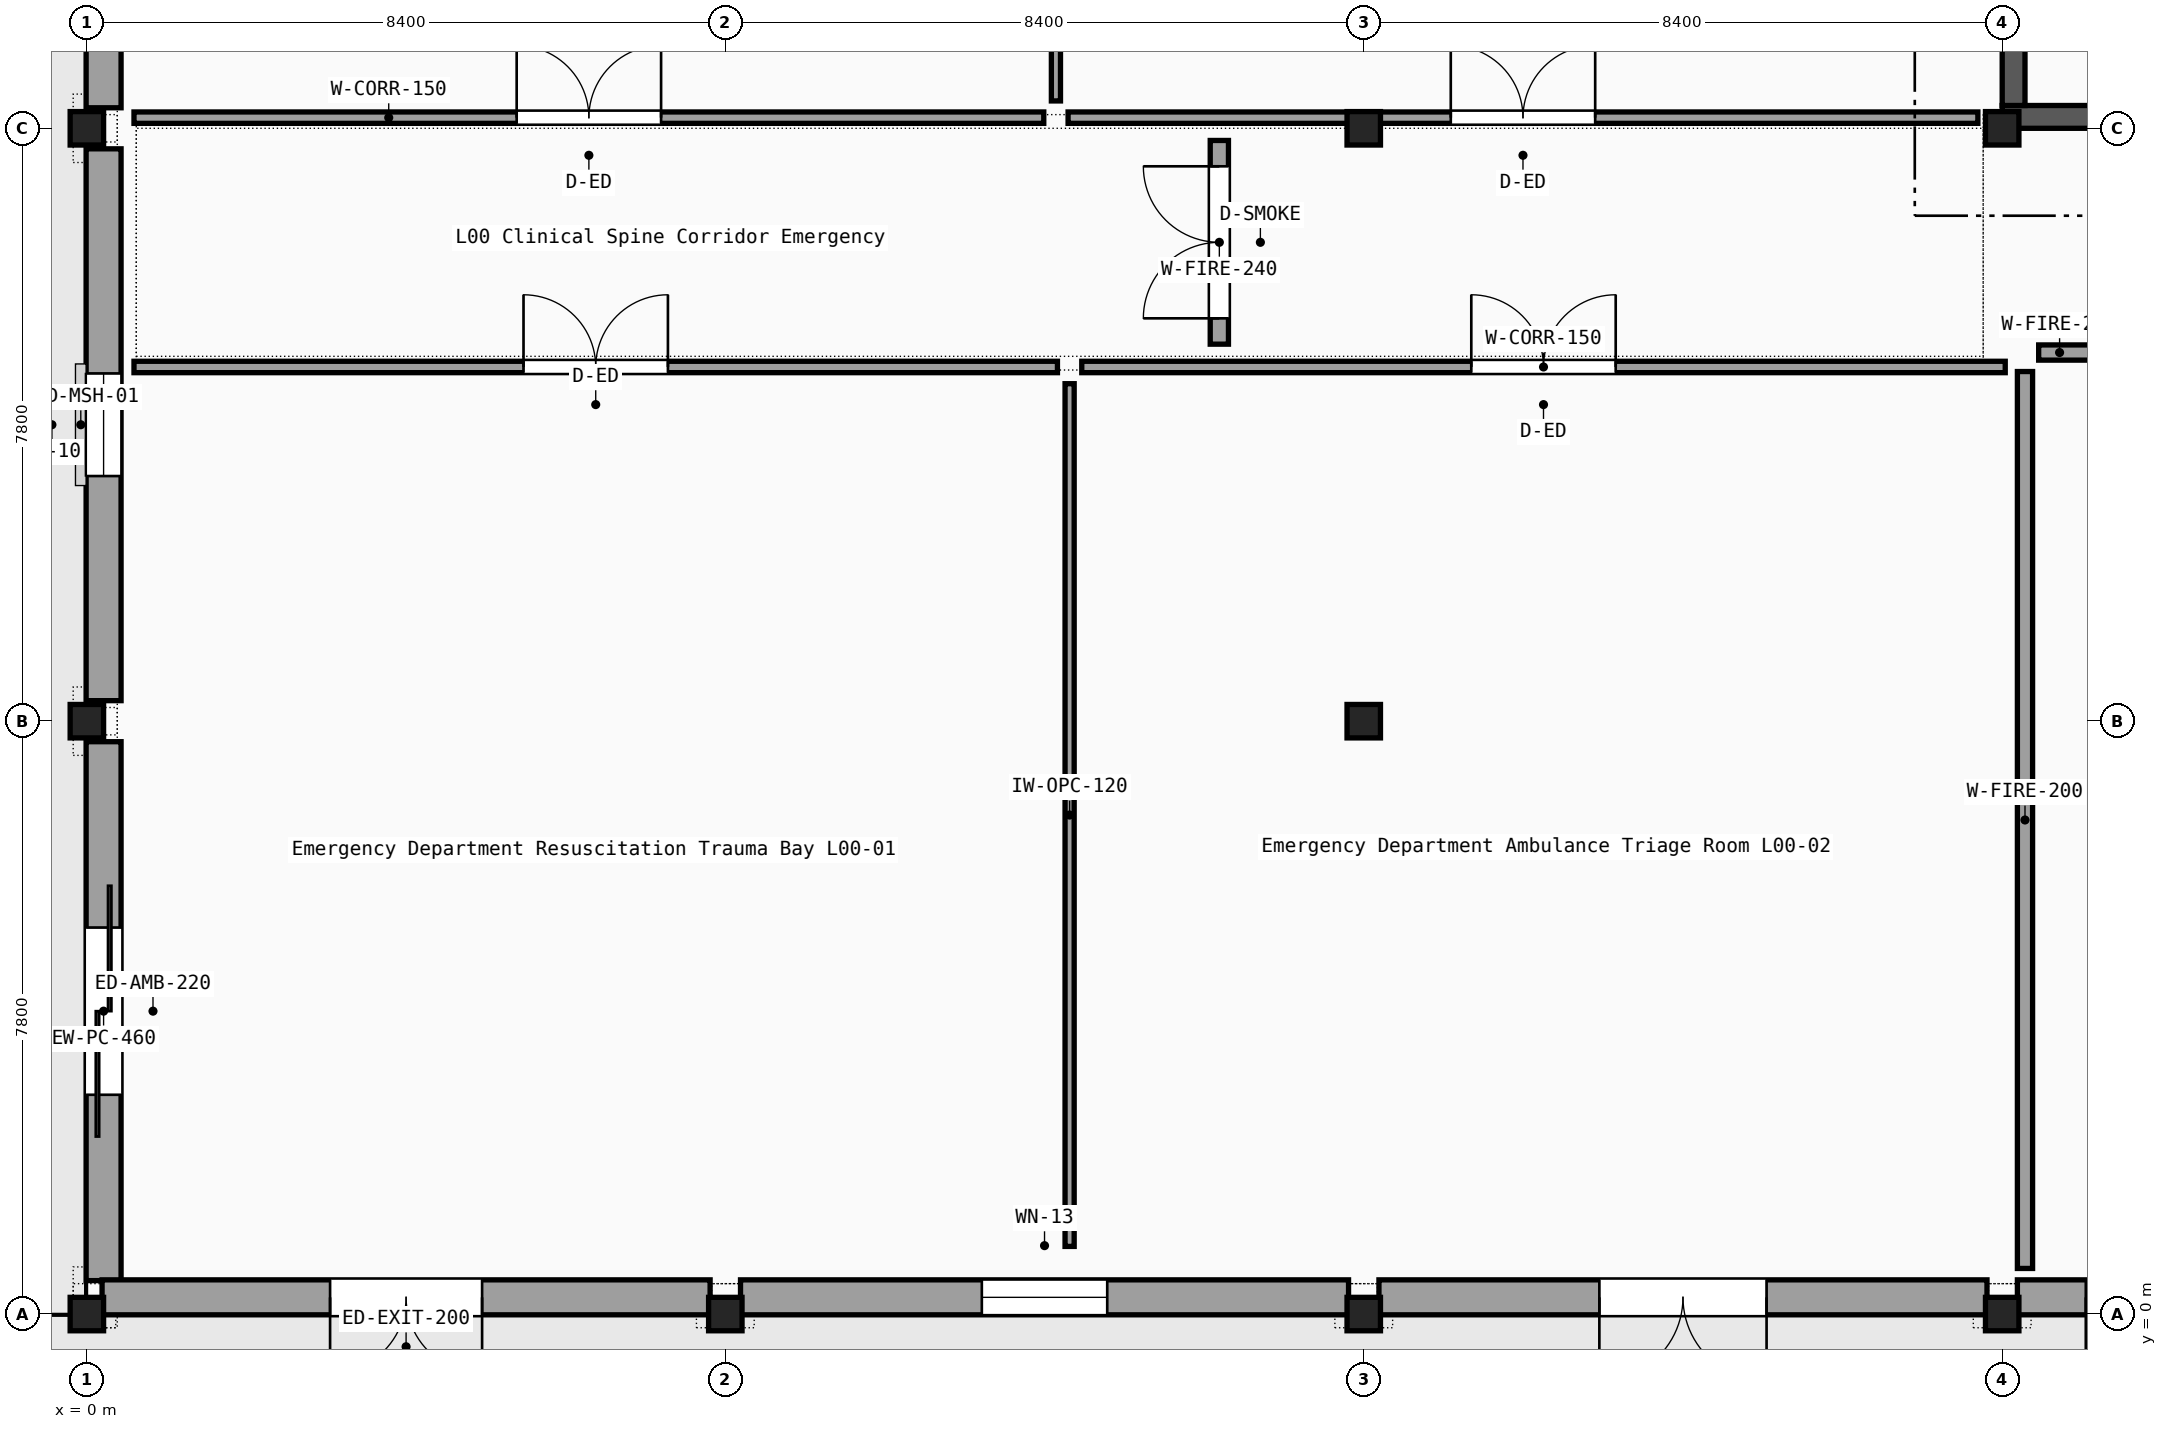
"""IFC4 building model, lengths in metres.
Left out: names, types, materials, properties, quantities, classifications, styles, units other than length and angle.
Written with IfcOpenShell. Run it as: python <this file> out.ifc"""

import sys

from ifc_helpers import new_model, si_unit, direction, frame, frame_2d, origin, origin_2d, place, context, subcontext, project, spatial, rectangle, i_section, extrude, element, fill, save


model = new_model("IFC4")
c1 = context("Model", 3, precision=1e-05, world=origin(), true_north=direction((0.0, 1.0)))
c2 = subcontext(c1, "Body", "Model", "MODEL_VIEW")
j1 = project(units=[si_unit("LENGTHUNIT", "METRE"), si_unit("PLANEANGLEUNIT", "RADIAN")], contexts=[c1])
p1 = place(None, origin())
s1 = spatial("IfcSite", under=j1, at=p1, CompositionType="ELEMENT")
p2 = place(p1, origin())
s2 = spatial("IfcBuilding", under=s1, at=p2, CompositionType="ELEMENT")
p3 = place(p2, origin())
s3 = spatial("IfcBuildingStorey", under=s2, at=p3, CompositionType="ELEMENT", Elevation=0.0)
for number, where, z_axis, x_axis in (
    (1, (0.0, 0.0, 0.0), (0.0, 0.0, 1.0), (1.0, 0.0, 0.0)),
    (2, (0.0, 7.8, 0.0), (0.0, 0.0, 1.0), (1.0, 0.0, 0.0)),
    (3, (0.0, 15.6, 0.0), (0.0, 0.0, 1.0), (1.0, 0.0, 0.0)),
    (4, (8.4, 0.0, 0.0), (0.0, 0.0, 1.0), (1.0, 0.0, 0.0)),
    (5, (16.8, 0.0, 0.0), (0.0, 0.0, 1.0), (1.0, 0.0, 0.0)),
    (6, (16.8, 7.8, 0.0), (0.0, 0.0, 1.0), (1.0, 0.0, 0.0)),
    (7, (16.8, 15.6, 0.0), (0.0, 0.0, 1.0), (1.0, 0.0, 0.0)),
    (8, (25.2, 0.0, 0.0), (0.0, 0.0, 1.0), (1.0, 0.0, 0.0)),
    (9, (25.2, 15.6, 0.0), (0.0, 0.0, 1.0), (1.0, 0.0, 0.0)),
):
    element("IfcColumn", number, at=place(p3, frame(where, z_axis=z_axis, x_axis=x_axis)), inside=s3, PredefinedType="COLUMN", context=c2, shape_type="SweptSolid", body=[
        extrude(i_section(OverallWidth=0.3, OverallDepth=0.44, WebThickness=0.011, FlangeThickness=0.021, FilletRadius=0.027, at=origin_2d()), origin(), (0.0, 0.0, 1.0), 5.1),
    ])
p4 = place(p3, frame((0.22, 0.44, 0.0), z_axis=(0.0, 0.0, 1.0), x_axis=(0.0, 1.0, 0.0)))
e10 = element("IfcWall", 10, at=p4, inside=s3, PredefinedType="SOLIDWALL", context=c2, shape_type="SweptSolid", body=[
    extrude(rectangle(XDim=7.09, YDim=0.46, at=frame_2d((3.545, 0.0))), origin(), (0.0, 0.0, 1.0), 4.33),
])
p5 = place(p4, frame((2.445, 0.0, 0.0)))
e11 = element("IfcOpeningElement", 11, at=p5, cuts=e10, PredefinedType="OPENING", context=c2, shape_type="SweptSolid", body=[
    extrude(rectangle(XDim=2.2, YDim=2.5, at=frame_2d((1.1, 1.25))), frame((0.0, 0.24, 0.0), z_axis=(0.0, -1.0, 0.0), x_axis=(1.0, 0.0, 0.0)), (0.0, 0.0, 1.0), 0.48),
])
p6 = place(p3, frame((0.22, 8.07, 0.0), z_axis=(0.0, 0.0, 1.0), x_axis=(0.0, 1.0, 0.0)))
e12 = element("IfcWall", 12, at=p6, inside=s3, PredefinedType="SOLIDWALL", context=c2, shape_type="SweptSolid", body=[
    extrude(rectangle(XDim=7.26, YDim=0.46, at=frame_2d((3.63, 0.0))), origin(), (0.0, 0.0, 1.0), 4.33),
])
p7 = place(p6, frame((2.955, 0.0, 1.0)))
e13 = element("IfcOpeningElement", 13, at=p7, cuts=e12, PredefinedType="OPENING", context=c2, shape_type="SweptSolid", body=[
    extrude(rectangle(XDim=1.35, YDim=1.45, at=frame_2d((0.675, 0.725))), frame((0.0, 0.24, 0.0), z_axis=(0.0, -1.0, 0.0), x_axis=(1.0, 0.0, 0.0)), (0.0, 0.0, 1.0), 0.48),
])
p8 = place(p3, frame((0.22, 15.87, 0.0), z_axis=(0.0, 0.0, 1.0), x_axis=(0.0, 1.0, 0.0)))
e14 = element("IfcWall", 14, at=p8, inside=s3, PredefinedType="SOLIDWALL", context=c2, shape_type="SweptSolid", body=[
    extrude(rectangle(XDim=7.26, YDim=0.46, at=frame_2d((3.63, 0.0))), origin(), (0.0, 0.0, 1.0), 4.33),
])
p9 = place(p8, frame((2.53, 0.0, 0.0)))
e15 = element("IfcOpeningElement", 15, at=p9, cuts=e14, PredefinedType="OPENING", context=c2, shape_type="SweptSolid", body=[
    extrude(rectangle(XDim=2.2, YDim=2.3, at=frame_2d((1.1, 1.15))), frame((0.0, 0.24, 0.0), z_axis=(0.0, -1.0, 0.0), x_axis=(1.0, 0.0, 0.0)), (0.0, 0.0, 1.0), 0.48),
])
p10 = place(p3, frame((0.2, 0.22, 0.0), z_axis=(0.0, 0.0, 1.0), x_axis=(1.0, 0.0, 0.0)))
e16 = element("IfcWall", 16, at=p10, inside=s3, PredefinedType="SOLIDWALL", context=c2, shape_type="SweptSolid", body=[
    extrude(rectangle(XDim=8.0, YDim=0.46, at=frame_2d((4.0, 0.0))), origin(), (0.0, 0.0, 1.0), 4.44),
])
p11 = place(p10, frame((3.0, 0.0, 0.0)))
e17 = element("IfcOpeningElement", 17, at=p11, cuts=e16, PredefinedType="OPENING", context=c2, shape_type="SweptSolid", body=[
    extrude(rectangle(XDim=2.0, YDim=2.25, at=frame_2d((1.0, 1.125))), frame((0.0, 0.24, 0.0), z_axis=(0.0, -1.0, 0.0), x_axis=(1.0, 0.0, 0.0)), (0.0, 0.0, 1.0), 0.48),
])
p12 = place(p3, frame((8.6, 0.22, 0.0), z_axis=(0.0, 0.0, 1.0), x_axis=(1.0, 0.0, 0.0)))
e18 = element("IfcWall", 18, at=p12, inside=s3, PredefinedType="SOLIDWALL", context=c2, shape_type="SweptSolid", body=[
    extrude(rectangle(XDim=8.0, YDim=0.46, at=frame_2d((4.0, 0.0))), origin(), (0.0, 0.0, 1.0), 4.43),
])
p13 = place(p12, frame((3.175, 0.0, 0.75)))
e19 = element("IfcOpeningElement", 19, at=p13, cuts=e18, PredefinedType="OPENING", context=c2, shape_type="SweptSolid", body=[
    extrude(rectangle(XDim=1.65, YDim=1.75, at=frame_2d((0.825, 0.875))), frame((0.0, 0.24, 0.0), z_axis=(0.0, -1.0, 0.0), x_axis=(1.0, 0.0, 0.0)), (0.0, 0.0, 1.0), 0.48),
])
p14 = place(p3, frame((17.0, 0.22, 0.0), z_axis=(0.0, 0.0, 1.0), x_axis=(1.0, 0.0, 0.0)))
e20 = element("IfcWall", 20, at=p14, inside=s3, PredefinedType="SOLIDWALL", context=c2, shape_type="SweptSolid", body=[
    extrude(rectangle(XDim=8.0, YDim=0.46, at=frame_2d((4.0, 0.0))), origin(), (0.0, 0.0, 1.0), 4.43),
])
p15 = place(p14, frame((2.9, 0.0, 0.0)))
e21 = element("IfcOpeningElement", 21, at=p15, cuts=e20, PredefinedType="OPENING", context=c2, shape_type="SweptSolid", body=[
    extrude(rectangle(XDim=2.2, YDim=2.3, at=frame_2d((1.1, 1.15))), frame((0.0, 0.24, 0.0), z_axis=(0.0, -1.0, 0.0), x_axis=(1.0, 0.0, 0.0)), (0.0, 0.0, 1.0), 0.48),
])
p16 = place(p3, frame((25.4, 0.22, 0.0), z_axis=(0.0, 0.0, 1.0), x_axis=(1.0, 0.0, 0.0)))
e22 = element("IfcWall", 22, at=p16, inside=s3, PredefinedType="SOLIDWALL", context=c2, shape_type="SweptSolid", body=[
    extrude(rectangle(XDim=8.0, YDim=0.46, at=frame_2d((4.0, 0.0))), origin(), (0.0, 0.0, 1.0), 4.43),
])
p17 = place(p16, frame((0.9, 0.0, 0.0)))
e23 = element("IfcOpeningElement", 23, at=p17, cuts=e22, PredefinedType="OPENING", context=c2, shape_type="SweptSolid", body=[
    extrude(rectangle(XDim=2.2, YDim=2.3, at=frame_2d((1.1, 1.15))), frame((0.0, 0.24, 0.0), z_axis=(0.0, -1.0, 0.0), x_axis=(1.0, 0.0, 0.0)), (0.0, 0.0, 1.0), 0.48),
])
p18 = place(p3, frame((25.2, 15.75, 0.0), z_axis=(0.0, 0.0, 1.0), x_axis=(1.0, 0.0, 0.0)))
e24 = element("IfcWall", 24, at=p18, inside=s3, PredefinedType="SHEAR", context=c2, shape_type="SweptSolid", body=[
    extrude(rectangle(XDim=8.4, YDim=0.3, at=frame_2d((4.2, 0.0))), origin(), (0.0, 0.0, 1.0), 4.85),
])
p19 = place(p18, frame((1.38, 0.0, 0.0)))
e25 = element("IfcOpeningElement", 25, at=p19, cuts=e24, PredefinedType="OPENING", context=c2, shape_type="SweptSolid", body=[
    extrude(rectangle(XDim=1.2, YDim=2.15, at=frame_2d((0.6, 1.075))), frame((0.0, 0.16, 0.0), z_axis=(0.0, -1.0, 0.0), x_axis=(1.0, 0.0, 0.0)), (0.0, 0.0, 1.0), 0.32),
])
p20 = place(p18, frame((4.43, 0.0, 0.0)))
e26 = element("IfcOpeningElement", 26, at=p20, cuts=e24, PredefinedType="OPENING", context=c2, shape_type="SweptSolid", body=[
    extrude(rectangle(XDim=1.1, YDim=2.15, at=frame_2d((0.55, 1.075))), frame((0.0, 0.16, 0.0), z_axis=(0.0, -1.0, 0.0), x_axis=(1.0, 0.0, 0.0)), (0.0, 0.0, 1.0), 0.32),
])
p21 = place(p3, frame((25.35, 15.9, 0.0), z_axis=(0.0, 0.0, 1.0), x_axis=(0.0, 1.0, 0.0)))
e27 = element("IfcWall", 27, at=p21, inside=s3, PredefinedType="SHEAR", context=c2, shape_type="SweptSolid", body=[
    extrude(rectangle(XDim=7.2, YDim=0.3, at=frame_2d((3.6, 0.0))), origin(), (0.0, 0.0, 1.0), 4.85),
])
p22 = place(p3, frame((25.5, 0.6, 0.0), z_axis=(0.0, 0.0, 1.0), x_axis=(0.0, 1.0, 0.0)))
e28 = element("IfcWall", 28, at=p22, inside=s3, PredefinedType="PARTITIONING", context=c2, shape_type="SweptSolid", body=[
    extrude(rectangle(XDim=11.8, YDim=0.2, at=frame_2d((5.9, 0.0))), origin(), (0.0, 0.0, 1.0), 4.33),
])
p23 = place(p3, frame((25.68, 12.65, 0.0), z_axis=(0.0, 0.0, 1.0), x_axis=(1.0, 0.0, 0.0)))
e29 = element("IfcWall", 29, at=p23, inside=s3, PredefinedType="PARTITIONING", context=c2, shape_type="SweptSolid", body=[
    extrude(rectangle(XDim=3.44, YDim=0.2, at=frame_2d((1.72, 0.0))), origin(), (0.0, 0.0, 1.0), 4.82),
])
p24 = place(p23, frame((0.92, 0.0, 0.0)))
e30 = element("IfcOpeningElement", 30, at=p24, cuts=e29, PredefinedType="OPENING", context=c2, shape_type="SweptSolid", body=[
    extrude(rectangle(XDim=1.6, YDim=2.2, at=frame_2d((0.8, 1.1))), frame((0.0, 0.11, 0.0), z_axis=(0.0, -1.0, 0.0), x_axis=(1.0, 0.0, 0.0)), (0.0, 0.0, 1.0), 0.22),
])
p25 = place(p3, frame((0.62, 12.46, 0.0), z_axis=(0.0, 0.0, 1.0), x_axis=(1.0, 0.0, 0.0)))
e31 = element("IfcWall", 31, at=p25, inside=s3, PredefinedType="PARTITIONING", context=c2, shape_type="SweptSolid", body=[
    extrude(rectangle(XDim=12.15, YDim=0.15, at=frame_2d((6.075, 0.0))), origin(), (0.0, 0.0, 1.0), 4.82),
])
p26 = place(p25, frame((5.125, 0.0, 0.0)))
e32 = element("IfcOpeningElement", 32, at=p26, cuts=e31, PredefinedType="OPENING", context=c2, shape_type="SweptSolid", body=[
    extrude(rectangle(XDim=1.9, YDim=2.35, at=frame_2d((0.95, 1.175))), frame((0.0, 0.085, 0.0), z_axis=(0.0, -1.0, 0.0), x_axis=(1.0, 0.0, 0.0)), (0.0, 0.0, 1.0), 0.17),
])
p27 = place(p3, frame((12.93, 0.89, 0.0), z_axis=(0.0, 0.0, 1.0), x_axis=(0.0, 1.0, 0.0)))
e33 = element("IfcWall", 33, at=p27, inside=s3, PredefinedType="PARTITIONING", context=c2, shape_type="SweptSolid", body=[
    extrude(rectangle(XDim=11.35, YDim=0.12, at=frame_2d((5.675, 0.0))), origin(), (0.0, 0.0, 1.0), 4.33),
])
p28 = place(p3, frame((13.09, 12.46, 0.0), z_axis=(0.0, 0.0, 1.0), x_axis=(1.0, 0.0, 0.0)))
e34 = element("IfcWall", 34, at=p28, inside=s3, PredefinedType="PARTITIONING", context=c2, shape_type="SweptSolid", body=[
    extrude(rectangle(XDim=12.15, YDim=0.15, at=frame_2d((6.075, 0.0))), origin(), (0.0, 0.0, 1.0), 4.43),
])
p29 = place(p28, frame((5.125, 0.0, 0.0)))
e35 = element("IfcOpeningElement", 35, at=p29, cuts=e34, PredefinedType="OPENING", context=c2, shape_type="SweptSolid", body=[
    extrude(rectangle(XDim=1.9, YDim=2.35, at=frame_2d((0.95, 1.175))), frame((0.0, 0.085, 0.0), z_axis=(0.0, -1.0, 0.0), x_axis=(1.0, 0.0, 0.0)), (0.0, 0.0, 1.0), 0.17),
])
p30 = place(p3, frame((0.62, 15.74, 0.0), z_axis=(0.0, 0.0, 1.0), x_axis=(1.0, 0.0, 0.0)))
e36 = element("IfcWall", 36, at=p30, inside=s3, PredefinedType="PARTITIONING", context=c2, shape_type="SweptSolid", body=[
    extrude(rectangle(XDim=11.97, YDim=0.15, at=frame_2d((5.985, 0.0))), origin(), (0.0, 0.0, 1.0), 4.33),
])
p31 = place(p30, frame((5.035, 0.0, 0.0)))
e37 = element("IfcOpeningElement", 37, at=p31, cuts=e36, PredefinedType="OPENING", context=c2, shape_type="SweptSolid", body=[
    extrude(rectangle(XDim=1.9, YDim=2.35, at=frame_2d((0.95, 1.175))), frame((0.0, 0.085, 0.0), z_axis=(0.0, -1.0, 0.0), x_axis=(1.0, 0.0, 0.0)), (0.0, 0.0, 1.0), 0.17),
])
p32 = place(p3, frame((12.75, 15.96, 0.0), z_axis=(0.0, 0.0, 1.0), x_axis=(0.0, 1.0, 0.0)))
e38 = element("IfcWall", 38, at=p32, inside=s3, PredefinedType="PARTITIONING", context=c2, shape_type="SweptSolid", body=[
    extrude(rectangle(XDim=22.35, YDim=0.12, at=frame_2d((11.175, 0.0))), origin(), (0.0, 0.0, 1.0), 4.33),
])
p33 = place(p3, frame((12.91, 15.74, 0.0), z_axis=(0.0, 0.0, 1.0), x_axis=(1.0, 0.0, 0.0)))
e39 = element("IfcWall", 39, at=p33, inside=s3, PredefinedType="PARTITIONING", context=c2, shape_type="SweptSolid", body=[
    extrude(rectangle(XDim=11.97, YDim=0.15, at=frame_2d((5.985, 0.0))), origin(), (0.0, 0.0, 1.0), 4.33),
])
p34 = place(p33, frame((5.035, 0.0, 0.0)))
e40 = element("IfcOpeningElement", 40, at=p34, cuts=e39, PredefinedType="OPENING", context=c2, shape_type="SweptSolid", body=[
    extrude(rectangle(XDim=1.9, YDim=2.35, at=frame_2d((0.95, 1.175))), frame((0.0, 0.085, 0.0), z_axis=(0.0, -1.0, 0.0), x_axis=(1.0, 0.0, 0.0)), (0.0, 0.0, 1.0), 0.17),
])
p35 = place(p3, frame((14.9, 12.76, 0.0), z_axis=(0.0, 0.0, 1.0), x_axis=(0.0, 1.0, 0.0)))
e41 = element("IfcWall", 41, at=p35, inside=s3, PredefinedType="PARTITIONING", context=c2, shape_type="SweptSolid", body=[
    extrude(rectangle(XDim=2.68, YDim=0.24, at=frame_2d((1.34, 0.0))), origin(), (0.0, 0.0, 1.0), 4.33),
])
p36 = place(p35, frame((0.34, 0.0, 0.0)))
e42 = element("IfcOpeningElement", 42, at=p36, cuts=e41, PredefinedType="OPENING", context=c2, shape_type="SweptSolid", body=[
    extrude(rectangle(XDim=2.0, YDim=2.3, at=frame_2d((1.0, 1.15))), frame((0.0, 0.13, 0.0), z_axis=(0.0, -1.0, 0.0), x_axis=(1.0, 0.0, 0.0)), (0.0, 0.0, 1.0), 0.26),
])
p37 = place(p5, origin())
e43 = element("IfcDoor", 43, at=p37, inside=s3, OperationType="DOUBLE_DOOR_SLIDING", PredefinedType="DOOR", context=c2, shape_type="SweptSolid", body=[
    extrude(rectangle(XDim=2.2, YDim=2.5, at=frame_2d((1.1, 1.25))), frame((0.0, 0.025, 0.0), z_axis=(0.0, -1.0, 0.0), x_axis=(1.0, 0.0, 0.0)), (0.0, 0.0, 1.0), 0.05),
])
fill(e11, e43)
p38 = place(p7, origin())
e44 = element("IfcWindow", 44, at=p38, inside=s3, PartitioningType="SINGLE_PANEL", PredefinedType="WINDOW", context=c2, shape_type="SweptSolid", body=[
    extrude(rectangle(XDim=1.35, YDim=1.45, at=frame_2d((0.675, 0.725))), frame((0.0, 0.03, 0.0), z_axis=(0.0, -1.0, 0.0), x_axis=(1.0, 0.0, 0.0)), (0.0, 0.0, 1.0), 0.06),
])
fill(e13, e44)
p39 = place(p11, frame((2.0, 0.0, 0.0), z_axis=(0.0, 0.0, 1.0), x_axis=(-1.0, 0.0, 0.0)))
e45 = element("IfcDoor", 45, at=p39, inside=s3, OperationType="DOUBLE_DOOR_SINGLE_SWING", PredefinedType="DOOR", context=c2, shape_type="SweptSolid", body=[
    extrude(rectangle(XDim=2.0, YDim=2.25, at=frame_2d((1.0, 1.125))), frame((0.0, 0.025, 0.0), z_axis=(0.0, -1.0, 0.0), x_axis=(1.0, 0.0, 0.0)), (0.0, 0.0, 1.0), 0.05),
])
fill(e17, e45)
p40 = place(p13, origin())
e46 = element("IfcWindow", 46, at=p40, inside=s3, PartitioningType="SINGLE_PANEL", PredefinedType="WINDOW", context=c2, shape_type="SweptSolid", body=[
    extrude(rectangle(XDim=1.65, YDim=1.75, at=frame_2d((0.825, 0.875))), frame((0.0, 0.03, 0.0), z_axis=(0.0, -1.0, 0.0), x_axis=(1.0, 0.0, 0.0)), (0.0, 0.0, 1.0), 0.06),
])
fill(e19, e46)
p41 = place(p15, frame((2.2, 0.0, 0.0), z_axis=(0.0, 0.0, 1.0), x_axis=(-1.0, 0.0, 0.0)))
e47 = element("IfcDoor", 47, at=p41, inside=s3, OperationType="DOUBLE_DOOR_SINGLE_SWING", PredefinedType="DOOR", context=c2, shape_type="SweptSolid", body=[
    extrude(rectangle(XDim=2.2, YDim=2.3, at=frame_2d((1.1, 1.15))), frame((0.0, 0.025, 0.0), z_axis=(0.0, -1.0, 0.0), x_axis=(1.0, 0.0, 0.0)), (0.0, 0.0, 1.0), 0.05),
])
fill(e21, e47)
p42 = place(p17, frame((2.2, 0.0, 0.0), z_axis=(0.0, 0.0, 1.0), x_axis=(-1.0, 0.0, 0.0)))
e48 = element("IfcDoor", 48, at=p42, inside=s3, OperationType="DOUBLE_DOOR_SINGLE_SWING", PredefinedType="DOOR", context=c2, shape_type="SweptSolid", body=[
    extrude(rectangle(XDim=2.2, YDim=2.3, at=frame_2d((1.1, 1.15))), frame((0.0, 0.025, 0.0), z_axis=(0.0, -1.0, 0.0), x_axis=(1.0, 0.0, 0.0)), (0.0, 0.0, 1.0), 0.05),
])
fill(e23, e48)
p43 = place(p26, origin())
e49 = element("IfcDoor", 49, at=p43, inside=s3, OperationType="DOUBLE_DOOR_SINGLE_SWING", PredefinedType="DOOR", context=c2, shape_type="SweptSolid", body=[
    extrude(rectangle(XDim=1.9, YDim=2.35, at=frame_2d((0.95, 1.175))), frame((0.0, 0.025, 0.0), z_axis=(0.0, -1.0, 0.0), x_axis=(1.0, 0.0, 0.0)), (0.0, 0.0, 1.0), 0.05),
])
fill(e32, e49)
p44 = place(p29, origin())
e50 = element("IfcDoor", 50, at=p44, inside=s3, OperationType="DOUBLE_DOOR_SINGLE_SWING", PredefinedType="DOOR", context=c2, shape_type="SweptSolid", body=[
    extrude(rectangle(XDim=1.9, YDim=2.35, at=frame_2d((0.95, 1.175))), frame((0.0, 0.025, 0.0), z_axis=(0.0, -1.0, 0.0), x_axis=(1.0, 0.0, 0.0)), (0.0, 0.0, 1.0), 0.05),
])
fill(e35, e50)
p45 = place(p31, origin())
e51 = element("IfcDoor", 51, at=p45, inside=s3, OperationType="DOUBLE_DOOR_SINGLE_SWING", PredefinedType="DOOR", context=c2, shape_type="SweptSolid", body=[
    extrude(rectangle(XDim=1.9, YDim=2.35, at=frame_2d((0.95, 1.175))), frame((0.0, 0.025, 0.0), z_axis=(0.0, -1.0, 0.0), x_axis=(1.0, 0.0, 0.0)), (0.0, 0.0, 1.0), 0.05),
])
fill(e37, e51)
p46 = place(p34, origin())
e52 = element("IfcDoor", 52, at=p46, inside=s3, OperationType="DOUBLE_DOOR_SINGLE_SWING", PredefinedType="DOOR", context=c2, shape_type="SweptSolid", body=[
    extrude(rectangle(XDim=1.9, YDim=2.35, at=frame_2d((0.95, 1.175))), frame((0.0, 0.025, 0.0), z_axis=(0.0, -1.0, 0.0), x_axis=(1.0, 0.0, 0.0)), (0.0, 0.0, 1.0), 0.05),
])
fill(e40, e52)
p47 = place(p36, origin())
e53 = element("IfcDoor", 53, at=p47, inside=s3, OperationType="DOUBLE_SWING_LEFT", PredefinedType="DOOR", context=c2, shape_type="SweptSolid", body=[
    extrude(rectangle(XDim=2.0, YDim=2.3, at=frame_2d((1.0, 1.15))), frame((0.0, 0.025, 0.0), z_axis=(0.0, -1.0, 0.0), x_axis=(1.0, 0.0, 0.0)), (0.0, 0.0, 1.0), 0.05),
])
fill(e42, e53)
save(model, sys.argv[1])
